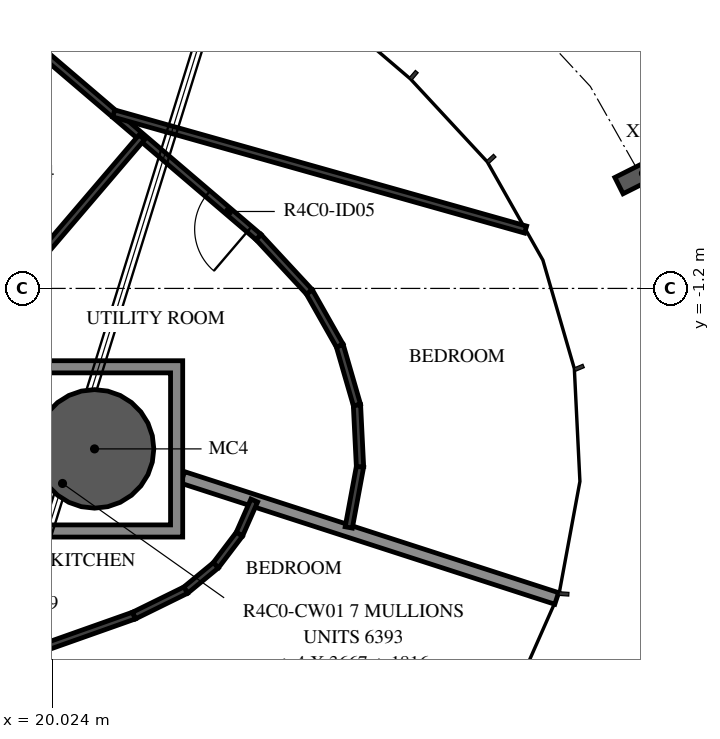
"""IFC4 building model, lengths in metres.
Left out: names, types, materials, properties, quantities, classifications, styles, units other than length and angle.
Written with IfcOpenShell. Run it as: python <this file> out.ifc"""

import sys

from ifc_helpers import new_model, si_unit, direction, frame, frame_2d, origin, origin_2d, place, context, subcontext, project, spatial, polyline, rectangle, hollow_circle, i_section, outline, extrude, element, fill, save


model = new_model("IFC4")
c1 = context("Model", 3, precision=1e-05, world=origin(), true_north=direction((0.0, 1.0)))
c2 = subcontext(c1, "Body", "Model", "MODEL_VIEW")
j1 = project(units=[si_unit("LENGTHUNIT", "METRE"), si_unit("PLANEANGLEUNIT", "RADIAN")], contexts=[c1])
p1 = place(None, origin())
s1 = spatial("IfcSite", under=j1, at=p1, CompositionType="ELEMENT")
p2 = place(p1, origin())
s2 = spatial("IfcBuilding", under=s1, at=p2, CompositionType="ELEMENT")
p3 = place(p2, frame((0.0, 0.0, 172.7)))
s3 = spatial("IfcBuildingStorey", under=s2, at=p3, CompositionType="ELEMENT", Elevation=172.7)
p4 = place(p3, frame((20.713, -3.839, -0.38), z_axis=(0.0, 0.0, 1.0), x_axis=(1.0, 0.0, 0.0)))
e1 = element("IfcColumn", 1, at=p4, inside=s3, PredefinedType="COLUMN", context=c2, shape_type="SweptSolid", body=[
    extrude(hollow_circle(Radius=0.975, WallThickness=0.045, at=origin_2d()), origin(), (0.0, 0.0, 1.0), 3.5),
])
p5 = place(p3, frame((29.74, 0.692, -0.38), z_axis=(0.0, 0.0, 1.0), x_axis=(0.448657012727, -0.893704025352, 0.0)))
e2 = element("IfcColumn", 2, at=p5, inside=s3, PredefinedType="COLUMN", context=c2, shape_type="SweptSolid", body=[
    extrude(i_section(OverallWidth=0.3, OverallDepth=0.9, WebThickness=0.019, FlangeThickness=0.035, FilletRadius=0.03, at=origin_2d()), origin(), (0.0, 0.0, 1.0), 3.5),
])
p6 = place(p3, frame((22.163, -4.308, 0.0), z_axis=(0.0, 0.0, 1.0), x_axis=(0.951422718769, -0.307887658426, 0.0)))
e3 = element("IfcWall", 3, at=p6, inside=s3, PredefinedType="STANDARD", context=c2, shape_type="SweptSolid", body=[
    extrude(rectangle(XDim=6.464, YDim=0.2, at=frame_2d((3.232, 0.0))), origin(), (0.0, 0.0, 1.0), 2.73),
])
p7 = place(p3, frame((23.411, -0.357, 0.0), z_axis=(0.0, 0.0, 1.0), x_axis=(-0.76041871148, 0.649433124525, 0.0)))
e4 = element("IfcWall", 4, at=p7, inside=s3, PredefinedType="PARTITIONING", context=c2, shape_type="SweptSolid", body=[
    extrude(rectangle(XDim=9.259, YDim=0.12, at=frame_2d((4.629, 0.0))), origin(), (0.0, 0.0, 1.0), 3.12),
])
p8 = place(p7, frame((6.972, 0.0, 0.0)))
e5 = element("IfcOpeningElement", 5, at=p8, cuts=e4, PredefinedType="OPENING", context=c2, shape_type="SweptSolid", body=[
    extrude(rectangle(XDim=0.9, YDim=2.1, at=frame_2d((0.45, 1.05))), frame((0.0, 0.07, 0.0), z_axis=(0.0, -1.0, 0.0), x_axis=(1.0, 0.0, 0.0)), (0.0, 0.0, 1.0), 0.14),
])
p9 = place(p7, frame((0.2, 0.0, 0.0)))
e6 = element("IfcOpeningElement", 6, at=p9, cuts=e4, PredefinedType="OPENING", context=c2, shape_type="SweptSolid", body=[
    extrude(rectangle(XDim=0.9, YDim=2.1, at=frame_2d((0.45, 1.05))), frame((0.0, 0.07, 0.0), z_axis=(0.0, -1.0, 0.0), x_axis=(1.0, 0.0, 0.0)), (0.0, 0.0, 1.0), 0.14),
])
p10 = place(p3, frame((17.9, -2.918, 0.0), z_axis=(0.0, 0.0, 1.0), x_axis=(0.649469887983, 0.760387312232, 0.0)))
e7 = element("IfcWall", 7, at=p10, inside=s3, PredefinedType="PARTITIONING", context=c2, shape_type="SweptSolid", body=[
    extrude(rectangle(XDim=5.527, YDim=0.12, at=frame_2d((2.763, 0.0))), origin(), (0.0, 0.0, 1.0), 3.12),
])
p11 = place(p10, frame((1.7, 0.0, 0.0)))
e8 = element("IfcOpeningElement", 8, at=p11, cuts=e7, PredefinedType="OPENING", context=c2, shape_type="SweptSolid", body=[
    extrude(rectangle(XDim=0.9, YDim=2.1, at=frame_2d((0.45, 1.05))), frame((0.0, 0.07, 0.0), z_axis=(0.0, -1.0, 0.0), x_axis=(1.0, 0.0, 0.0)), (0.0, 0.0, 1.0), 0.14),
])
p12 = place(p3, frame((21.029, 1.677, 0.0), z_axis=(0.0, 0.0, 1.0), x_axis=(0.962458274539, -0.271429677396, 0.0)))
e9 = element("IfcWall", 9, at=p12, inside=s3, PredefinedType="PARTITIONING", context=c2, shape_type="SweptSolid", body=[
    extrude(rectangle(XDim=7.037, YDim=0.12, at=frame_2d((3.519, 0.0))), origin(), (0.0, 0.0, 1.0), 3.12),
])
for number, where, z_axis, x_axis in (
    (10, (24.894, -5.131, 0.0), (0.0, 0.0, 1.0), (0.182, 0.983, 0.0)),
    (11, (25.079, -4.132, 0.0), (0.0, 0.0, 1.0), (-0.049, 0.999, 0.0)),
):
    element("IfcWall", number, at=place(p3, frame(where, z_axis=z_axis, x_axis=x_axis)), inside=s3, PredefinedType="PARTITIONING", context=c2, shape_type="SweptSolid", body=[
        extrude(rectangle(XDim=1.016, YDim=0.12, at=frame_2d((0.508, 0.0))), origin(), (0.0, 0.0, 1.0), 3.12),
    ])
for number, where, z_axis, x_axis in (
    (12, (25.029, -3.117, 0.0), (0.0, 0.0, 1.0), (-0.279, 0.96, 0.0)),
    (13, (24.746, -2.141, 0.0), (0.0, 0.0, 1.0), (-0.492, 0.87, 0.0)),
):
    element("IfcWall", number, at=place(p3, frame(where, z_axis=z_axis, x_axis=x_axis)), inside=s3, PredefinedType="PARTITIONING", context=c2, shape_type="SweptSolid", body=[
        extrude(rectangle(XDim=1.016, YDim=0.12, at=frame_2d((0.508, 0.0))), origin(), (0.0, 0.0, 1.0), 3.12),
    ])
p13 = place(p3, frame((24.246, -1.257, 0.0), z_axis=(0.0, 0.0, 1.0), x_axis=(-0.679840361176, 0.733360132074, 0.0)))
e14 = element("IfcWall", 14, at=p13, inside=s3, PredefinedType="PARTITIONING", context=c2, shape_type="SweptSolid", body=[
    extrude(rectangle(XDim=1.227, YDim=0.12, at=frame_2d((0.614, 0.0))), origin(), (0.0, 0.0, 1.0), 3.12),
])
p14 = place(p3, frame((21.362, -6.58, 0.0), z_axis=(0.0, 0.0, 1.0), x_axis=(-0.942647598157, -0.333789612913, 0.0)))
e15 = element("IfcWall", 15, at=p14, inside=s3, PredefinedType="PARTITIONING", context=c2, shape_type="SweptSolid", body=[
    extrude(rectangle(XDim=11.234, YDim=0.12, at=frame_2d((5.617, 0.0))), origin(), (0.0, 0.0, 1.0), 3.12),
])
p15 = place(p3, frame((23.34, -4.689, 0.0), z_axis=(0.0, 0.0, 1.0), x_axis=(-0.404077449371, -0.914724775498, 0.0)))
e16 = element("IfcWall", 16, at=p15, inside=s3, PredefinedType="PARTITIONING", context=c2, shape_type="SweptSolid", body=[
    extrude(rectangle(XDim=0.605, YDim=0.12, at=frame_2d((0.302, 0.0))), origin(), (0.0, 0.0, 1.0), 3.12),
])
for number, where, z_axis, x_axis in (
    (17, (23.095, -5.242, 0.0), (0.0, 0.0, 1.0), (-0.604, -0.797, 0.0)),
    (18, (22.708, -5.754, 0.0), (0.0, 0.0, 1.0), (-0.772, -0.636, 0.0)),
):
    element("IfcWall", number, at=place(p3, frame(where, z_axis=z_axis, x_axis=x_axis)), inside=s3, PredefinedType="PARTITIONING", context=c2, shape_type="SweptSolid", body=[
        extrude(rectangle(XDim=0.642, YDim=0.12, at=frame_2d((0.321, 0.0))), origin(), (0.0, 0.0, 1.0), 3.12),
    ])
p16 = place(p3, frame((22.212, -6.162, 0.0), z_axis=(0.0, 0.0, 1.0), x_axis=(-0.897448694974, -0.441118850072, 0.0)))
e19 = element("IfcWall", 19, at=p16, inside=s3, PredefinedType="PARTITIONING", context=c2, shape_type="SweptSolid", body=[
    extrude(rectangle(XDim=0.947, YDim=0.12, at=frame_2d((0.474, 0.0))), origin(), (0.0, 0.0, 1.0), 3.12),
])
p17 = place(p3, origin())
e20 = element("IfcWall", 20, at=p17, inside=s3, PredefinedType="STANDARD", context=c2, shape_type="SweptSolid", body=[
    extrude(outline(polyline([(22.163, -2.389), (22.163, -5.289), (19.263, -5.289), (19.263, -2.389), (22.163, -2.389)]), holes=[polyline([(19.463, -5.089), (21.963, -5.089), (21.963, -2.589), (19.463, -2.589), (19.463, -5.089)])]), origin(), (0.0, 0.0, 1.0), 3.12),
])
p18 = place(p9, origin())
e21 = element("IfcDoor", 21, at=p18, inside=s3, OperationType="SINGLE_SWING_LEFT", PredefinedType="DOOR", context=c2, shape_type="SweptSolid", body=[
    extrude(rectangle(XDim=0.9, YDim=2.1, at=frame_2d((0.45, 1.05))), frame((0.0, 0.025, 0.0), z_axis=(0.0, -1.0, 0.0), x_axis=(1.0, 0.0, 0.0)), (0.0, 0.0, 1.0), 0.05),
])
fill(e6, e21)
save(model, sys.argv[1])
